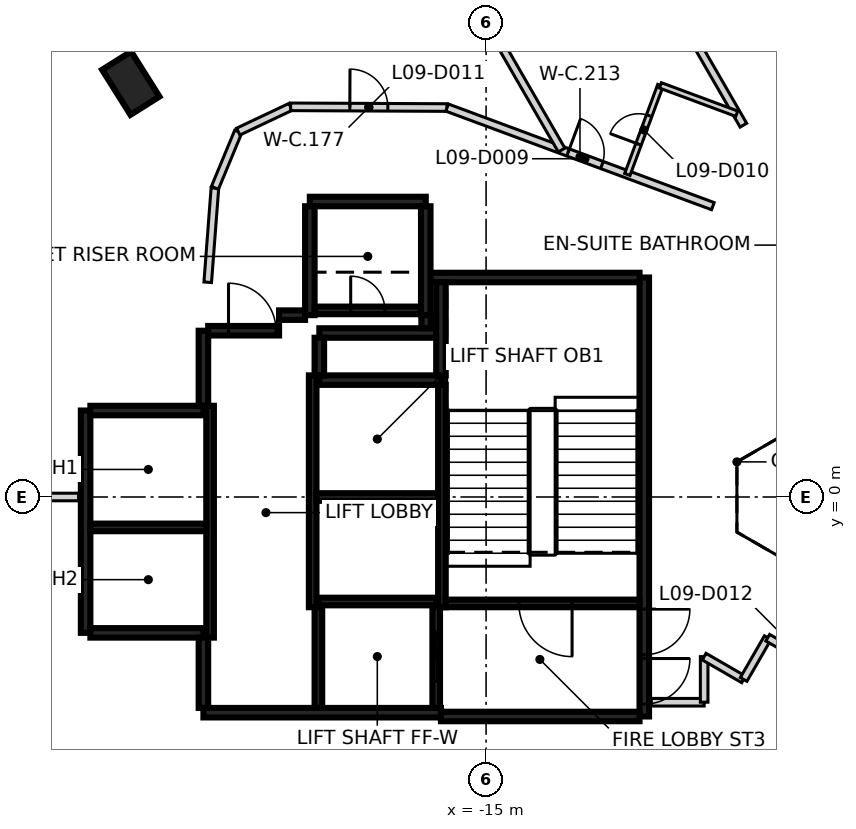
"""IFC4 building model, lengths in metres.
Left out: names, types, materials, properties, quantities, classifications, styles, units other than length and angle.
Written with IfcOpenShell. Run it as: python <this file> out.ifc"""

import sys

from ifc_helpers import new_model, si_unit, direction, frame, frame_2d, origin, origin_2d, place, context, subcontext, project, spatial, rectangle, extrude, element, fill, save


model = new_model("IFC4")
c1 = context("Model", 3, precision=1e-05, world=origin(), true_north=direction((0.0, 1.0)))
c2 = subcontext(c1, "Body", "Model", "MODEL_VIEW")
j1 = project(units=[si_unit("LENGTHUNIT", "METRE"), si_unit("PLANEANGLEUNIT", "RADIAN")], contexts=[c1])
p1 = place(None, origin())
s1 = spatial("IfcSite", under=j1, at=p1, CompositionType="ELEMENT")
p2 = place(p1, origin())
s2 = spatial("IfcBuilding", under=s1, at=p2, CompositionType="ELEMENT")
p3 = place(p2, frame((0.0, 0.0, 45.8)))
s3 = spatial("IfcBuildingStorey", under=s2, at=p3, CompositionType="ELEMENT", Elevation=45.8)
p4 = place(p3, frame((-24.349, 10.888, -0.475), z_axis=(0.0, 0.0, 1.0), x_axis=(-0.532388815436, 0.84649994046, 0.0)))
e1 = element("IfcColumn", 1, at=p4, inside=s3, PredefinedType="COLUMN", context=c2, shape_type="SweptSolid", body=[
    extrude(rectangle(XDim=1.4, YDim=0.9, at=origin_2d()), origin(), (0.0, 0.0, 1.0), 3.6),
])
p5 = place(p3, frame((-10.837, 5.775, 0.0), z_axis=(0.0, 0.0, 1.0), x_axis=(0.0, -1.0, 0.0)))
e2 = element("IfcWall", 2, at=p5, inside=s3, PredefinedType="SHEAR", context=c2, shape_type="SweptSolid", body=[
    extrude(rectangle(XDim=11.55, YDim=0.25, at=frame_2d((5.775, 0.0))), origin(), (0.0, 0.0, 1.0), 3.125),
])
p6 = place(p5, frame((10.025, 0.0, 0.0)))
e3 = element("IfcOpeningElement", 3, at=p6, cuts=e2, PredefinedType="OPENING", context=c2, shape_type="SweptSolid", body=[
    extrude(rectangle(XDim=1.2, YDim=2.1, at=frame_2d((0.6, 1.05))), frame((0.0, 0.135, 0.0), z_axis=(0.0, -1.0, 0.0), x_axis=(1.0, 0.0, 0.0)), (0.0, 0.0, 1.0), 0.27),
])
p7 = place(p5, frame((8.725, 0.0, 0.0)))
e4 = element("IfcOpeningElement", 4, at=p7, cuts=e2, PredefinedType="OPENING", context=c2, shape_type="SweptSolid", body=[
    extrude(rectangle(XDim=1.2, YDim=2.1, at=frame_2d((0.6, 1.05))), frame((0.0, 0.135, 0.0), z_axis=(0.0, -1.0, 0.0), x_axis=(1.0, 0.0, 0.0)), (0.0, 0.0, 1.0), 0.27),
])
p8 = place(p3, frame((-16.187, -5.675, 0.0), z_axis=(0.0, 0.0, 1.0), x_axis=(-1.0, 0.0, 0.0)))
e5 = element("IfcWall", 5, at=p8, inside=s3, PredefinedType="SHEAR", context=c2, shape_type="SweptSolid", body=[
    extrude(rectangle(XDim=6.25, YDim=0.25, at=frame_2d((3.125, 0.0))), origin(), (0.0, 0.0, 1.0), 3.125),
])
p9 = place(p3, frame((-25.537, -3.575, 0.0), z_axis=(0.0, 0.0, 1.0), x_axis=(0.0, 1.0, 0.0)))
e6 = element("IfcWall", 6, at=p9, inside=s3, PredefinedType="SHEAR", context=c2, shape_type="SweptSolid", body=[
    extrude(rectangle(XDim=5.85, YDim=0.25, at=frame_2d((2.925, 0.0))), origin(), (0.0, 0.0, 1.0), 3.125),
])
p10 = place(p3, frame((-10.963, -5.775, 0.0), z_axis=(0.0, 0.0, 1.0), x_axis=(-1.0, 0.0, 0.0)))
e7 = element("IfcWall", 7, at=p10, inside=s3, PredefinedType="SHEAR", context=c2, shape_type="SweptSolid", body=[
    extrude(rectangle(XDim=5.225, YDim=0.25, at=frame_2d((2.612, 0.0))), origin(), (0.0, 0.0, 1.0), 3.125),
])
p11 = place(p3, frame((-16.472, 5.775, 0.0), z_axis=(0.0, 0.0, 1.0), x_axis=(1.0, 0.0, 0.0)))
e8 = element("IfcWall", 8, at=p11, inside=s3, PredefinedType="SHEAR", context=c2, shape_type="SweptSolid", body=[
    extrude(rectangle(XDim=5.51, YDim=0.25, at=frame_2d((2.755, 0.0))), origin(), (0.0, 0.0, 1.0), 3.125),
])
p12 = place(p3, frame((-19.387, 3.075, 0.0), z_axis=(0.0, 0.0, 1.0), x_axis=(1.0, 0.0, 0.0)))
e9 = element("IfcWall", 9, at=p12, inside=s3, PredefinedType="SHEAR", context=c2, shape_type="SweptSolid", body=[
    extrude(rectangle(XDim=3.2, YDim=0.25, at=frame_2d((1.6, 0.0))), origin(), (0.0, 0.0, 1.0), 3.125),
])
for number, where, z_axis, x_axis in (
    (10, (-22.437, -3.575, 0.0), (0.0, 0.0, 1.0), (-1.0, 0.0, 0.0)),
    (11, (-25.412, 2.275, 0.0), (0.0, 0.0, 1.0), (1.0, 0.0, 0.0)),
):
    element("IfcWall", number, at=place(p3, frame(where, z_axis=z_axis, x_axis=x_axis)), inside=s3, PredefinedType="SHEAR", context=c2, shape_type="SweptSolid", body=[
        extrude(rectangle(XDim=2.975, YDim=0.25, at=frame_2d((1.487, 0.0))), origin(), (0.0, 0.0, 1.0), 3.125),
    ])
p13 = place(p3, frame((-19.637, 7.775, 0.0), z_axis=(0.0, 0.0, 1.0), x_axis=(1.0, 0.0, 0.0)))
e12 = element("IfcWall", 12, at=p13, inside=s3, PredefinedType="SHEAR", context=c2, shape_type="SweptSolid", body=[
    extrude(rectangle(XDim=3.05, YDim=0.25, at=frame_2d((1.525, 0.0))), origin(), (0.0, 0.0, 1.0), 3.125),
])
for number, where, z_axis, x_axis in (
    (13, (-16.587, 7.65, 0.0), (0.0, 0.0, 1.0), (0.0, -1.0, 0.0)),
    (14, (-19.637, 4.785, 0.0), (0.0, 0.0, 1.0), (0.0, 1.0, 0.0)),
):
    element("IfcWall", number, at=place(p3, frame(where, z_axis=z_axis, x_axis=x_axis)), inside=s3, PredefinedType="SHEAR", context=c2, shape_type="SweptSolid", body=[
        extrude(rectangle(XDim=2.865, YDim=0.25, at=frame_2d((1.432, 0.0))), origin(), (0.0, 0.0, 1.0), 3.125),
    ])
p14 = place(p3, frame((-16.302, 4.315, 0.0), z_axis=(0.0, 0.0, 1.0), x_axis=(-1.0, 0.0, 0.0)))
e15 = element("IfcWall", 15, at=p14, inside=s3, PredefinedType="SHEAR", context=c2, shape_type="SweptSolid", body=[
    extrude(rectangle(XDim=3.085, YDim=0.25, at=frame_2d((1.542, 0.0))), origin(), (0.0, 0.0, 1.0), 3.125),
])
p15 = place(p3, frame((-16.187, 3.2, 0.0), z_axis=(0.0, 0.0, 1.0), x_axis=(0.0, 1.0, 0.0)))
e16 = element("IfcWall", 16, at=p15, inside=s3, PredefinedType="SHEAR", context=c2, shape_type="SweptSolid", body=[
    extrude(rectangle(XDim=2.449, YDim=0.25, at=frame_2d((1.225, 0.0))), origin(), (0.0, 0.0, 1.0), 3.125),
])
p16 = place(p3, frame((-22.437, 2.4, 0.0), z_axis=(0.0, 0.0, 1.0), x_axis=(0.0, 1.0, 0.0)))
e17 = element("IfcWall", 17, at=p16, inside=s3, PredefinedType="SHEAR", context=c2, shape_type="SweptSolid", body=[
    extrude(rectangle(XDim=1.975, YDim=0.25, at=frame_2d((0.987, 0.0))), origin(), (0.0, 0.0, 1.0), 3.125),
])
p17 = place(p3, frame((-22.437, -5.55, 0.0), z_axis=(0.0, 0.0, 1.0), x_axis=(0.0, 1.0, 0.0)))
e18 = element("IfcWall", 18, at=p17, inside=s3, PredefinedType="SHEAR", context=c2, shape_type="SweptSolid", body=[
    extrude(rectangle(XDim=1.849, YDim=0.25, at=frame_2d((0.925, 0.0))), origin(), (0.0, 0.0, 1.0), 3.125),
])
p18 = place(p3, frame((-22.312, 4.375, 0.0), z_axis=(0.0, 0.0, 1.0), x_axis=(1.0, 0.0, 0.0)))
e19 = element("IfcWall", 19, at=p18, inside=s3, PredefinedType="SHEAR", context=c2, shape_type="SweptSolid", body=[
    extrude(rectangle(XDim=1.865, YDim=0.25, at=frame_2d((0.932, 0.0))), origin(), (0.0, 0.0, 1.0), 3.125),
])
p19 = place(p18, frame((0.535, 0.0, 0.0)))
e20 = element("IfcOpeningElement", 20, at=p19, cuts=e19, PredefinedType="OPENING", context=c2, shape_type="SweptSolid", body=[
    extrude(rectangle(XDim=1.25, YDim=2.1, at=frame_2d((0.625, 1.05))), frame((0.0, 0.135, 0.0), z_axis=(0.0, -1.0, 0.0), x_axis=(1.0, 0.0, 0.0)), (0.0, 0.0, 1.0), 0.27),
])
p20 = place(p3, frame((-19.387, 4.19, 0.0), z_axis=(0.0, 0.0, 1.0), x_axis=(0.0, -1.0, 0.0)))
e21 = element("IfcWall", 21, at=p20, inside=s3, PredefinedType="SHEAR", context=c2, shape_type="SweptSolid", body=[
    extrude(rectangle(XDim=0.989, YDim=0.25, at=frame_2d((0.495, 0.0))), origin(), (0.0, 0.0, 1.0), 3.125),
])
p21 = place(p3, frame((-20.447, 4.785, 0.0), z_axis=(0.0, 0.0, 1.0), x_axis=(1.0, 0.0, 0.0)))
e22 = element("IfcWall", 22, at=p21, inside=s3, PredefinedType="SHEAR", context=c2, shape_type="SweptSolid", body=[
    extrude(rectangle(XDim=0.685, YDim=0.25, at=frame_2d((0.342, 0.0))), origin(), (0.0, 0.0, 1.0), 3.125),
])
p22 = place(p3, frame((-16.577, 4.785, 0.0), z_axis=(0.0, 0.0, 1.0), x_axis=(0.0, -1.0, 0.0)))
e23 = element("IfcWall", 23, at=p22, inside=s3, PredefinedType="SHEAR", context=c2, shape_type="SweptSolid", body=[
    extrude(rectangle(XDim=0.344, YDim=0.25, at=frame_2d((0.172, 0.0))), origin(), (0.0, 0.0, 1.0), 3.125),
])
p23 = place(p3, frame((-16.162, 2.951, 0.0), z_axis=(0.0, 0.0, 1.0), x_axis=(0.0, -1.0, 0.0)))
e24 = element("IfcWall", 24, at=p23, inside=s3, PredefinedType="SHEAR", context=c2, shape_type="SweptSolid", body=[
    extrude(rectangle(XDim=5.851, YDim=0.2, at=frame_2d((2.925, 0.0))), origin(), (0.0, 0.0, 1.0), 3.125),
])
for number, where, z_axis, x_axis in (
    (25, (-19.562, -2.9, 0.0), (0.0, 0.0, 1.0), (0.0, 1.0, 0.0)),
    (26, (-22.262, 2.4, 0.0), (0.0, 0.0, 1.0), (0.0, -1.0, 0.0)),
):
    element("IfcWall", number, at=place(p3, frame(where, z_axis=z_axis, x_axis=x_axis)), inside=s3, PredefinedType="SHEAR", context=c2, shape_type="SweptSolid", body=[
        extrude(rectangle(XDim=6.1, YDim=0.2, at=frame_2d((3.05, 0.0))), origin(), (0.0, 0.0, 1.0), 3.125),
    ])
p24 = place(p3, frame((-10.963, -2.8, 0.0), z_axis=(0.0, 0.0, 1.0), x_axis=(-1.0, 0.0, 0.0)))
e27 = element("IfcWall", 27, at=p24, inside=s3, PredefinedType="SHEAR", context=c2, shape_type="SweptSolid", body=[
    extrude(rectangle(XDim=5.098, YDim=0.2, at=frame_2d((2.549, 0.0))), origin(), (0.0, 0.0, 1.0), 3.125),
])
p25 = place(p24, frame((1.774, 0.0, 0.0)))
e28 = element("IfcOpeningElement", 28, at=p25, cuts=e27, PredefinedType="OPENING", context=c2, shape_type="SweptSolid", body=[
    extrude(rectangle(XDim=1.4, YDim=2.1, at=frame_2d((0.7, 1.05))), frame((0.0, 0.11, 0.0), z_axis=(0.0, -1.0, 0.0), x_axis=(1.0, 0.0, 0.0)), (0.0, 0.0, 1.0), 0.22),
])
p26 = place(p3, frame((-16.263, 0.0, 0.0), z_axis=(0.0, 0.0, 1.0), x_axis=(-1.0, 0.0, 0.0)))
e29 = element("IfcWall", 29, at=p26, inside=s3, PredefinedType="SHEAR", context=c2, shape_type="SweptSolid", body=[
    extrude(rectangle(XDim=3.198, YDim=0.2, at=frame_2d((1.599, 0.0))), origin(), (0.0, 0.0, 1.0), 3.125),
])
p27 = place(p3, frame((-22.363, -0.8, 0.0), z_axis=(0.0, 0.0, 1.0), x_axis=(-1.0, 0.0, 0.0)))
e30 = element("IfcWall", 30, at=p27, inside=s3, PredefinedType="SHEAR", context=c2, shape_type="SweptSolid", body=[
    extrude(rectangle(XDim=3.048, YDim=0.2, at=frame_2d((1.524, 0.0))), origin(), (0.0, 0.0, 1.0), 3.125),
])
p28 = place(p3, frame((-19.511, 4.91, 0.0), z_axis=(0.0, 0.0, 1.0), x_axis=(1.0, 0.0, 0.0)))
e31 = element("IfcWall", 31, at=p28, inside=s3, PredefinedType="SHEAR", context=c2, shape_type="SweptSolid", body=[
    extrude(rectangle(XDim=2.798, YDim=0.2, at=frame_2d((1.399, 0.0))), origin(), (0.0, 0.0, 1.0), 3.125),
])
p29 = place(p28, frame((0.949, 0.0, 0.0)))
e32 = element("IfcOpeningElement", 32, at=p29, cuts=e31, PredefinedType="OPENING", context=c2, shape_type="SweptSolid", body=[
    extrude(rectangle(XDim=0.9, YDim=2.1, at=frame_2d((0.45, 1.05))), frame((0.0, 0.11, 0.0), z_axis=(0.0, -1.0, 0.0), x_axis=(1.0, 0.0, 0.0)), (0.0, 0.0, 1.0), 0.22),
])
p30 = place(p3, frame((-19.412, -2.75, 0.0), z_axis=(0.0, 0.0, 1.0), x_axis=(1.0, 0.0, 0.0)))
e33 = element("IfcWall", 33, at=p30, inside=s3, PredefinedType="SHEAR", context=c2, shape_type="SweptSolid", body=[
    extrude(rectangle(XDim=3.1, YDim=0.2, at=frame_2d((1.55, 0.0))), origin(), (0.0, 0.0, 1.0), 3.125),
])
p31 = place(p3, frame((-16.312, -2.898, 0.0), z_axis=(0.0, 0.0, 1.0), x_axis=(0.0, -1.0, 0.0)))
e34 = element("IfcWall", 34, at=p31, inside=s3, PredefinedType="SHEAR", context=c2, shape_type="SweptSolid", body=[
    extrude(rectangle(XDim=2.651, YDim=0.2, at=frame_2d((1.325, 0.0))), origin(), (0.0, 0.0, 1.0), 3.125),
])
p32 = place(p31, frame((0.652, 0.0, 0.0)))
e35 = element("IfcOpeningElement", 35, at=p32, cuts=e34, PredefinedType="OPENING", context=c2, shape_type="SweptSolid", body=[
    extrude(rectangle(XDim=1.3, YDim=2.1, at=frame_2d((0.65, 1.05))), frame((0.0, 0.11, 0.0), z_axis=(0.0, -1.0, 0.0), x_axis=(1.0, 0.0, 0.0)), (0.0, 0.0, 1.0), 0.22),
])
p33 = place(p3, frame((-19.412, -5.549, 0.0), z_axis=(0.0, 0.0, 1.0), x_axis=(0.0, 1.0, 0.0)))
e36 = element("IfcWall", 36, at=p33, inside=s3, PredefinedType="SHEAR", context=c2, shape_type="SweptSolid", body=[
    extrude(rectangle(XDim=2.651, YDim=0.2, at=frame_2d((1.325, 0.0))), origin(), (0.0, 0.0, 1.0), 3.125),
])
p34 = place(p3, frame((-22.135, 8.13, 0.0), z_axis=(0.0, 0.0, 1.0), x_axis=(-0.076073461031, -0.997102215686, 0.0)))
e37 = element("IfcWall", 37, at=p34, inside=s3, PredefinedType="PARTITIONING", context=c2, shape_type="SweptSolid", body=[
    extrude(rectangle(XDim=2.487, YDim=0.2, at=frame_2d((1.244, 0.0))), origin(), (0.0, 0.0, 1.0), 3.125),
])
p35 = place(p3, frame((-22.135, 8.134, 0.0), z_axis=(0.0, 0.0, 1.0), x_axis=(0.383208453534, 0.923661886807, 0.0)))
e38 = element("IfcWall", 38, at=p35, inside=s3, PredefinedType="PARTITIONING", context=c2, shape_type="SweptSolid", body=[
    extrude(rectangle(XDim=1.602, YDim=0.2, at=frame_2d((0.801, 0.0))), origin(), (0.0, 0.0, 1.0), 3.125),
])
p36 = place(p3, frame((-21.521, 9.614, 0.0), z_axis=(0.0, 0.0, 1.0), x_axis=(0.904083527367, 0.427355795028, 0.0)))
e39 = element("IfcWall", 39, at=p36, inside=s3, PredefinedType="PARTITIONING", context=c2, shape_type="SweptSolid", body=[
    extrude(rectangle(XDim=1.523, YDim=0.2, at=frame_2d((0.761, 0.0))), origin(), (0.0, 0.0, 1.0), 3.125),
])
p37 = place(p3, frame((-20.143, 10.266, 0.0), z_axis=(0.0, 0.0, 1.0), x_axis=(0.999989297417, -0.004626559416, 0.0)))
e40 = element("IfcWall", 40, at=p37, inside=s3, PredefinedType="PARTITIONING", context=c2, shape_type="SweptSolid", body=[
    extrude(rectangle(XDim=4.116, YDim=0.2, at=frame_2d((2.058, 0.0))), origin(), (0.0, 0.0, 1.0), 3.125),
])
p38 = place(p37, frame((1.558, 0.0, 0.0)))
e41 = element("IfcOpeningElement", 41, at=p38, cuts=e40, PredefinedType="OPENING", context=c2, shape_type="SweptSolid", body=[
    extrude(rectangle(XDim=1.0, YDim=2.1, at=frame_2d((0.5, 1.05))), frame((0.0, 0.11, 0.0), z_axis=(0.0, -1.0, 0.0), x_axis=(1.0, 0.0, 0.0)), (0.0, 0.0, 1.0), 0.22),
])
p39 = place(p3, frame((-16.026, 10.246, 0.0), z_axis=(0.0, 0.0, 1.0), x_axis=(0.937598236139, -0.347720502112, 0.0)))
e42 = element("IfcWall", 42, at=p39, inside=s3, PredefinedType="PARTITIONING", context=c2, shape_type="SweptSolid", body=[
    extrude(rectangle(XDim=7.458, YDim=0.2, at=frame_2d((3.729, 0.0))), origin(), (0.0, 0.0, 1.0), 3.125),
])
p40 = place(p39, frame((3.396, 0.0, 0.0)))
e43 = element("IfcOpeningElement", 43, at=p40, cuts=e42, PredefinedType="OPENING", context=c2, shape_type="SweptSolid", body=[
    extrude(rectangle(XDim=0.95, YDim=2.1, at=frame_2d((0.475, 1.05))), frame((0.0, 0.11, 0.0), z_axis=(0.0, -1.0, 0.0), x_axis=(1.0, 0.0, 0.0)), (0.0, 0.0, 1.0), 0.22),
])
p41 = place(p3, frame((-10.652, -5.4, 0.0), z_axis=(0.0, 0.0, 1.0), x_axis=(1.0, 0.0, 0.0)))
e44 = element("IfcWall", 44, at=p41, inside=s3, PredefinedType="PARTITIONING", context=c2, shape_type="SweptSolid", body=[
    extrude(rectangle(XDim=1.39, YDim=0.2, at=frame_2d((0.695, 0.0))), origin(), (0.0, 0.0, 1.0), 3.125),
])
for number, where, z_axis, x_axis in (
    (45, (-9.262, -5.4, 0.0), (0.0, 0.0, 1.0), (0.0, 1.0, 0.0)),
    (46, (-9.262, -4.2, 0.0), (0.0, 0.0, 1.0), (0.866, -0.5, 0.0)),
):
    element("IfcWall", number, at=place(p3, frame(where, z_axis=z_axis, x_axis=x_axis)), inside=s3, PredefinedType="PARTITIONING", context=c2, shape_type="SweptSolid", body=[
        extrude(rectangle(XDim=1.2, YDim=0.2, at=frame_2d((0.6, 0.0))), origin(), (0.0, 0.0, 1.0), 3.125),
    ])
p42 = place(p3, frame((-8.223, -4.8, 0.0), z_axis=(0.0, 0.0, 1.0), x_axis=(0.499866914522, 0.866102227088, 0.0)))
e47 = element("IfcWall", 47, at=p42, inside=s3, PredefinedType="PARTITIONING", context=c2, shape_type="SweptSolid", body=[
    extrude(rectangle(XDim=1.268, YDim=0.2, at=frame_2d((0.634, 0.0))), origin(), (0.0, 0.0, 1.0), 3.125),
])
p43 = place(p3, frame((-7.589, -3.702, 0.0), z_axis=(0.0, 0.0, 1.0), x_axis=(0.865994210678, -0.500054024153, 0.0)))
e48 = element("IfcWall", 48, at=p43, inside=s3, PredefinedType="PARTITIONING", context=c2, shape_type="SweptSolid", body=[
    extrude(rectangle(XDim=6.969, YDim=0.2, at=frame_2d((3.484, 0.0))), origin(), (0.0, 0.0, 1.0), 3.125),
])
p44 = place(p43, frame((0.749, 0.0, 0.0)))
e49 = element("IfcOpeningElement", 49, at=p44, cuts=e48, PredefinedType="OPENING", context=c2, shape_type="SweptSolid", body=[
    extrude(rectangle(XDim=1.0, YDim=2.1, at=frame_2d((0.5, 1.05))), frame((0.0, 0.11, 0.0), z_axis=(0.0, -1.0, 0.0), x_axis=(1.0, 0.0, 0.0)), (0.0, 0.0, 1.0), 0.22),
])
p45 = place(p43, frame((2.674, 0.0, 0.0)))
e50 = element("IfcOpeningElement", 50, at=p45, cuts=e48, PredefinedType="OPENING", context=c2, shape_type="SweptSolid", body=[
    extrude(rectangle(XDim=0.95, YDim=2.1, at=frame_2d((0.475, 1.05))), frame((0.0, 0.11, 0.0), z_axis=(0.0, -1.0, 0.0), x_axis=(1.0, 0.0, 0.0)), (0.0, 0.0, 1.0), 0.22),
])
p46 = place(p3, frame((-33.478, 0.0, 0.0), z_axis=(0.0, 0.0, 1.0), x_axis=(1.0, 0.0, 0.0)))
e51 = element("IfcWall", 51, at=p46, inside=s3, PredefinedType="PARTITIONING", context=c2, shape_type="SweptSolid", body=[
    extrude(rectangle(XDim=7.756, YDim=0.2, at=frame_2d((3.878, 0.0))), origin(), (0.0, 0.0, 1.0), 3.125),
])
p47 = place(p3, frame((-17.996, 17.758, 0.0), z_axis=(0.0, 0.0, 1.0), x_axis=(0.500046945013, -0.865998298372, 0.0)))
e52 = element("IfcWall", 52, at=p47, inside=s3, PredefinedType="PARTITIONING", context=c2, shape_type="SweptSolid", body=[
    extrude(rectangle(XDim=9.964, YDim=0.2, at=frame_2d((4.982, 0.0))), origin(), (0.0, 0.0, 1.0), 3.125),
])
p48 = place(p3, frame((-14.149, 20.035, 0.0), z_axis=(0.0, 0.0, 1.0), x_axis=(0.500022967158, -0.866012143284, 0.0)))
e53 = element("IfcWall", 53, at=p48, inside=s3, PredefinedType="PARTITIONING", context=c2, shape_type="SweptSolid", body=[
    extrude(rectangle(XDim=11.838, YDim=0.2, at=frame_2d((5.919, 0.0))), origin(), (0.0, 0.0, 1.0), 3.125),
])
p49 = place(p3, frame((-14.148, -20.035, 0.0), z_axis=(0.0, 0.0, 1.0), x_axis=(0.499978771293, 0.866037659837, 0.0)))
e54 = element("IfcWall", 54, at=p49, inside=s3, PredefinedType="PARTITIONING", context=c2, shape_type="SweptSolid", body=[
    extrude(rectangle(XDim=17.425, YDim=0.2, at=frame_2d((8.712, 0.0))), origin(), (0.0, 0.0, 1.0), 3.125),
])
p50 = place(p3, frame((-10.276, 22.271, 0.0), z_axis=(0.0, 0.0, 1.0), x_axis=(0.499958184216, -0.866049544793, 0.0)))
e55 = element("IfcWall", 55, at=p50, inside=s3, PredefinedType="PARTITIONING", context=c2, shape_type="SweptSolid", body=[
    extrude(rectangle(XDim=17.422, YDim=0.2, at=frame_2d((8.711, 0.0))), origin(), (0.0, 0.0, 1.0), 3.125),
])
p51 = place(p3, frame((-11.283, 8.487, 0.0), z_axis=(0.0, 0.0, 1.0), x_axis=(0.347921729873, 0.937523583641, 0.0)))
e56 = element("IfcWall", 56, at=p51, inside=s3, PredefinedType="PARTITIONING", context=c2, shape_type="SweptSolid", body=[
    extrude(rectangle(XDim=2.5, YDim=0.15, at=frame_2d((1.25, 0.0))), origin(), (0.0, 0.0, 1.0), 3.125),
])
p52 = place(p51, frame((0.85, 0.0, 0.0)))
e57 = element("IfcOpeningElement", 57, at=p52, cuts=e56, PredefinedType="OPENING", context=c2, shape_type="SweptSolid", body=[
    extrude(rectangle(XDim=0.8, YDim=2.1, at=frame_2d((0.4, 1.05))), frame((0.0, 0.085, 0.0), z_axis=(0.0, -1.0, 0.0), x_axis=(1.0, 0.0, 0.0)), (0.0, 0.0, 1.0), 0.17),
])
p53 = place(p3, frame((-10.413, 10.831, 0.0), z_axis=(0.0, 0.0, 1.0), x_axis=(0.937443331153, -0.348137904971, 0.0)))
e58 = element("IfcWall", 58, at=p53, inside=s3, PredefinedType="PARTITIONING", context=c2, shape_type="SweptSolid", body=[
    extrude(rectangle(XDim=2.143, YDim=0.15, at=frame_2d((1.072, 0.0))), origin(), (0.0, 0.0, 1.0), 3.125),
])
p54 = place(p32, origin())
e59 = element("IfcDoor", 59, at=p54, inside=s3, OperationType="SLIDING_TO_RIGHT", PredefinedType="DOOR", context=c2, shape_type="SweptSolid", body=[
    extrude(rectangle(XDim=1.3, YDim=2.1, at=frame_2d((0.65, 1.05))), frame((0.0, 0.025, 0.0), z_axis=(0.0, -1.0, 0.0), x_axis=(1.0, 0.0, 0.0)), (0.0, 0.0, 1.0), 0.05),
])
fill(e35, e59)
p55 = place(p19, origin())
e60 = element("IfcDoor", 60, at=p55, inside=s3, OperationType="SINGLE_SWING_LEFT", PredefinedType="DOOR", context=c2, shape_type="SweptSolid", body=[
    extrude(rectangle(XDim=1.25, YDim=2.1, at=frame_2d((0.625, 1.05))), frame((0.0, 0.025, 0.0), z_axis=(0.0, -1.0, 0.0), x_axis=(1.0, 0.0, 0.0)), (0.0, 0.0, 1.0), 0.05),
])
fill(e20, e60)
p56 = place(p6, origin())
e61 = element("IfcDoor", 61, at=p56, inside=s3, OperationType="SINGLE_SWING_LEFT", PredefinedType="DOOR", context=c2, shape_type="SweptSolid", body=[
    extrude(rectangle(XDim=1.2, YDim=2.1, at=frame_2d((0.6, 1.05))), frame((0.0, 0.025, 0.0), z_axis=(0.0, -1.0, 0.0), x_axis=(1.0, 0.0, 0.0)), (0.0, 0.0, 1.0), 0.05),
])
fill(e3, e61)
p57 = place(p7, origin())
e62 = element("IfcDoor", 62, at=p57, inside=s3, OperationType="SINGLE_SWING_RIGHT", PredefinedType="DOOR", context=c2, shape_type="SweptSolid", body=[
    extrude(rectangle(XDim=1.2, YDim=2.1, at=frame_2d((0.6, 1.05))), frame((0.0, 0.025, 0.0), z_axis=(0.0, -1.0, 0.0), x_axis=(1.0, 0.0, 0.0)), (0.0, 0.0, 1.0), 0.05),
])
fill(e4, e62)
p58 = place(p25, origin())
e63 = element("IfcDoor", 63, at=p58, inside=s3, OperationType="SINGLE_SWING_RIGHT", PredefinedType="DOOR", context=c2, shape_type="SweptSolid", body=[
    extrude(rectangle(XDim=1.4, YDim=2.1, at=frame_2d((0.7, 1.05))), frame((0.0, 0.025, 0.0), z_axis=(0.0, -1.0, 0.0), x_axis=(1.0, 0.0, 0.0)), (0.0, 0.0, 1.0), 0.05),
])
fill(e28, e63)
p59 = place(p29, origin())
e64 = element("IfcDoor", 64, at=p59, inside=s3, OperationType="SINGLE_SWING_LEFT", PredefinedType="DOOR", context=c2, shape_type="SweptSolid", body=[
    extrude(rectangle(XDim=0.9, YDim=2.1, at=frame_2d((0.45, 1.05))), frame((0.0, 0.025, 0.0), z_axis=(0.0, -1.0, 0.0), x_axis=(1.0, 0.0, 0.0)), (0.0, 0.0, 1.0), 0.05),
])
fill(e32, e64)
p60 = place(p40, origin())
e65 = element("IfcDoor", 65, at=p60, inside=s3, OperationType="SINGLE_SWING_LEFT", PredefinedType="DOOR", context=c2, shape_type="SweptSolid", body=[
    extrude(rectangle(XDim=0.95, YDim=2.1, at=frame_2d((0.475, 1.05))), frame((0.0, 0.025, 0.0), z_axis=(0.0, -1.0, 0.0), x_axis=(1.0, 0.0, 0.0)), (0.0, 0.0, 1.0), 0.05),
])
fill(e43, e65)
p61 = place(p52, origin())
e66 = element("IfcDoor", 66, at=p61, inside=s3, OperationType="SINGLE_SWING_LEFT", PredefinedType="DOOR", context=c2, shape_type="SweptSolid", body=[
    extrude(rectangle(XDim=0.8, YDim=2.1, at=frame_2d((0.4, 1.05))), frame((0.0, 0.025, 0.0), z_axis=(0.0, -1.0, 0.0), x_axis=(1.0, 0.0, 0.0)), (0.0, 0.0, 1.0), 0.05),
])
fill(e57, e66)
p62 = place(p38, frame((1.0, 0.0, 0.0), z_axis=(0.0, 0.0, 1.0), x_axis=(-1.0, 0.0, 0.0)))
e67 = element("IfcDoor", 67, at=p62, inside=s3, OperationType="SINGLE_SWING_LEFT", PredefinedType="DOOR", context=c2, shape_type="SweptSolid", body=[
    extrude(rectangle(XDim=1.0, YDim=2.1, at=frame_2d((0.5, 1.05))), frame((0.0, 0.025, 0.0), z_axis=(0.0, -1.0, 0.0), x_axis=(1.0, 0.0, 0.0)), (0.0, 0.0, 1.0), 0.05),
])
fill(e41, e67)
save(model, sys.argv[1])
